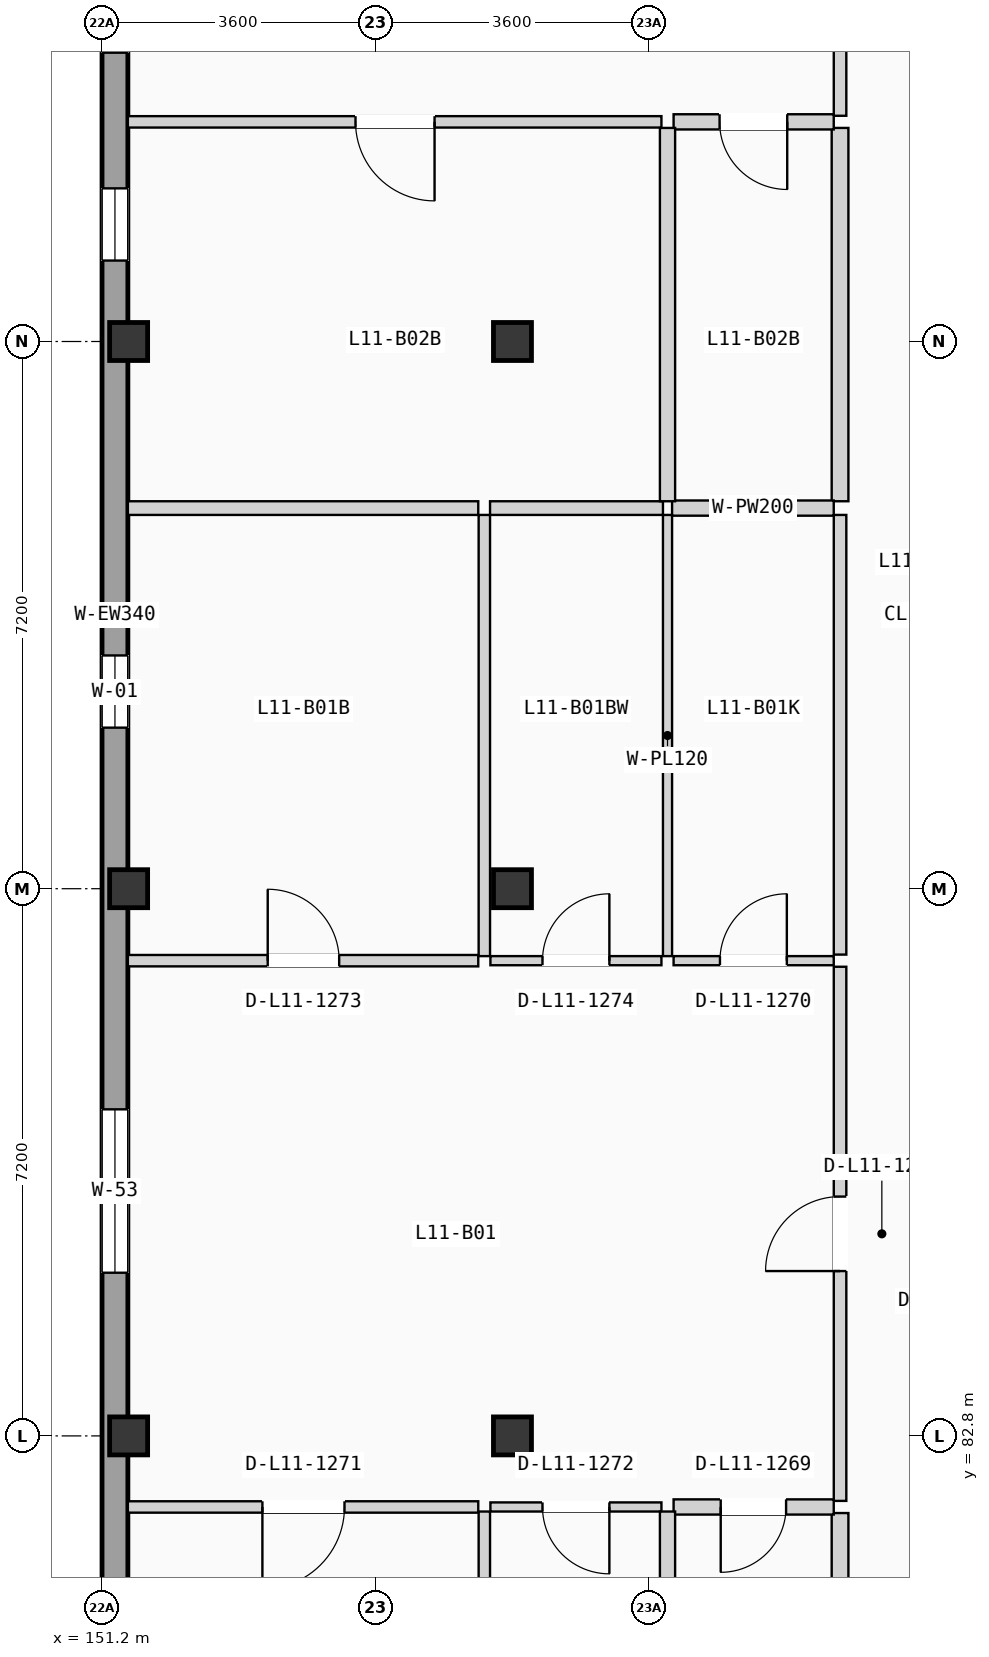
"""IFC4 building model, lengths in metres.
Left out: names, types, materials, properties, quantities, classifications, styles, units other than length and angle.
Written with IfcOpenShell. Run it as: python <this file> out.ifc"""

import sys

from ifc_helpers import new_model, si_unit, direction, frame, frame_2d, origin, origin_2d, place, context, subcontext, project, spatial, rectangle, extrude, element, fill, save


model = new_model("IFC4")
c1 = context("Model", 3, precision=1e-05, world=origin(), true_north=direction((0.0, 1.0)))
c2 = subcontext(c1, "Body", "Model", "MODEL_VIEW")
j1 = project(units=[si_unit("LENGTHUNIT", "METRE"), si_unit("PLANEANGLEUNIT", "RADIAN")], contexts=[c1])
p1 = place(None, origin())
s1 = spatial("IfcSite", under=j1, at=p1, CompositionType="ELEMENT")
p2 = place(p1, origin())
s2 = spatial("IfcBuilding", under=s1, at=p2, CompositionType="ELEMENT")
p3 = place(p2, frame((0.0, 0.0, 37.275)))
s3 = spatial("IfcBuildingStorey", under=s2, at=p3, CompositionType="ELEMENT", Elevation=37.275)
for number, where, z_axis, x_axis in (
    (1, (151.55, 82.8, 0.0), (0.0, 0.0, 1.0), (1.0, 0.0, 0.0)),
    (2, (151.55, 90.0, 0.0), (0.0, 0.0, 1.0), (1.0, 0.0, 0.0)),
    (3, (151.55, 97.2, 0.0), (0.0, 0.0, 1.0), (1.0, 0.0, 0.0)),
    (4, (156.6, 82.8, 0.0), (0.0, 0.0, 1.0), (1.0, 0.0, 0.0)),
    (5, (156.6, 90.0, 0.0), (0.0, 0.0, 1.0), (1.0, 0.0, 0.0)),
    (6, (156.6, 97.2, 0.0), (0.0, 0.0, 1.0), (1.0, 0.0, 0.0)),
):
    element("IfcColumn", number, at=place(p3, frame(where, z_axis=z_axis, x_axis=x_axis)), inside=s3, PredefinedType="COLUMN", context=c2, shape_type="SweptSolid", body=[
        extrude(rectangle(XDim=0.5, YDim=0.5, at=origin_2d()), origin(), (0.0, 0.0, 1.0), 3.15),
    ])
p4 = place(p3, frame((151.37, 68.74, 0.0), z_axis=(0.0, 0.0, 1.0), x_axis=(0.0, 1.0, 0.0)))
e7 = element("IfcWall", 7, at=p4, inside=s3, PredefinedType="SOLIDWALL", context=c2, shape_type="SweptSolid", body=[
    extrude(rectangle(XDim=49.72, YDim=0.34, at=frame_2d((24.86, 0.0))), origin(), (0.0, 0.0, 1.0), 2.6),
])
p5 = place(p4, frame((16.207, 0.0, 0.665)))
e8 = element("IfcOpeningElement", 8, at=p5, cuts=e7, PredefinedType="OPENING", context=c2, shape_type="SweptSolid", body=[
    extrude(rectangle(XDim=2.15, YDim=1.5, at=frame_2d((1.075, 0.75))), frame((0.0, 0.18, 0.0), z_axis=(0.0, -1.0, 0.0), x_axis=(1.0, 0.0, 0.0)), (0.0, 0.0, 1.0), 0.36),
])
p6 = place(p4, frame((9.078, 0.0, 0.515)))
e9 = element("IfcOpeningElement", 9, at=p6, cuts=e7, PredefinedType="OPENING", context=c2, shape_type="SweptSolid", body=[
    extrude(rectangle(XDim=2.15, YDim=1.65, at=frame_2d((1.075, 0.825))), frame((0.0, 0.18, 0.0), z_axis=(0.0, -1.0, 0.0), x_axis=(1.0, 0.0, 0.0)), (0.0, 0.0, 1.0), 0.36),
])
p7 = place(p4, frame((23.379, 0.0, 0.85)))
e10 = element("IfcOpeningElement", 10, at=p7, cuts=e7, PredefinedType="OPENING", context=c2, shape_type="SweptSolid", body=[
    extrude(rectangle(XDim=0.95, YDim=1.2, at=frame_2d((0.475, 0.6))), frame((0.0, 0.18, 0.0), z_axis=(0.0, -1.0, 0.0), x_axis=(1.0, 0.0, 0.0)), (0.0, 0.0, 1.0), 0.36),
])
p8 = place(p4, frame((32.26, 0.0, 0.9)))
e11 = element("IfcOpeningElement", 11, at=p8, cuts=e7, PredefinedType="OPENING", context=c2, shape_type="SweptSolid", body=[
    extrude(rectangle(XDim=2.3, YDim=1.2, at=frame_2d((1.15, 0.6))), frame((0.0, 0.18, 0.0), z_axis=(0.0, -1.0, 0.0), x_axis=(1.0, 0.0, 0.0)), (0.0, 0.0, 1.0), 0.36),
])
p9 = place(p4, frame((29.525, 0.0, 0.85)))
e12 = element("IfcOpeningElement", 12, at=p9, cuts=e7, PredefinedType="OPENING", context=c2, shape_type="SweptSolid", body=[
    extrude(rectangle(XDim=0.95, YDim=1.2, at=frame_2d((0.475, 0.6))), frame((0.0, 0.18, 0.0), z_axis=(0.0, -1.0, 0.0), x_axis=(1.0, 0.0, 0.0)), (0.0, 0.0, 1.0), 0.36),
])
p10 = place(p4, frame((38.854, 0.0, 0.665)))
e13 = element("IfcOpeningElement", 13, at=p10, cuts=e7, PredefinedType="OPENING", context=c2, shape_type="SweptSolid", body=[
    extrude(rectangle(XDim=2.3, YDim=1.5, at=frame_2d((1.15, 0.75))), frame((0.0, 0.18, 0.0), z_axis=(0.0, -1.0, 0.0), x_axis=(1.0, 0.0, 0.0)), (0.0, 0.0, 1.0), 0.36),
])
p11 = place(p3, frame((160.91, 81.945, 0.0), z_axis=(0.0, 0.0, 1.0), x_axis=(0.0, 1.0, 0.0)))
e14 = element("IfcWall", 14, at=p11, inside=s3, PredefinedType="PARTITIONING", context=c2, shape_type="SweptSolid", body=[
    extrude(rectangle(XDim=7.028, YDim=0.165, at=frame_2d((3.514, 0.0))), origin(), (0.0, 0.0, 1.0), 2.87),
])
p12 = place(p11, frame((3.024, 0.0, 0.0)))
e15 = element("IfcOpeningElement", 15, at=p12, cuts=e14, PredefinedType="OPENING", context=c2, shape_type="SweptSolid", body=[
    extrude(rectangle(XDim=0.98, YDim=2.08, at=frame_2d((0.49, 1.04))), frame((0.0, 0.093, 0.0), z_axis=(0.0, -1.0, 0.0), x_axis=(1.0, 0.0, 0.0)), (0.0, 0.0, 1.0), 0.185),
])
p13 = place(p3, frame((160.91, 76.0, 0.0), z_axis=(0.0, 0.0, 1.0), x_axis=(0.0, 1.0, 0.0)))
e16 = element("IfcWall", 16, at=p13, inside=s3, PredefinedType="PLUMBINGWALL", context=c2, shape_type="SweptSolid", body=[
    extrude(rectangle(XDim=5.785, YDim=0.22, at=frame_2d((2.893, 0.0))), origin(), (0.0, 0.0, 1.0), 2.87),
])
p14 = place(p3, frame((160.91, 89.133, 0.0), z_axis=(0.0, 0.0, 1.0), x_axis=(0.0, 1.0, 0.0)))
e17 = element("IfcWall", 17, at=p14, inside=s3, PredefinedType="PARTITIONING", context=c2, shape_type="SweptSolid", body=[
    extrude(rectangle(XDim=5.785, YDim=0.165, at=frame_2d((2.893, 0.0))), origin(), (0.0, 0.0, 1.0), 2.87),
])
p15 = place(p3, frame((160.91, 100.17, 0.0), z_axis=(0.0, 0.0, 1.0), x_axis=(0.0, 1.0, 0.0)))
e18 = element("IfcWall", 18, at=p15, inside=s3, PredefinedType="PARTITIONING", context=c2, shape_type="SweptSolid", body=[
    extrude(rectangle(XDim=5.958, YDim=0.165, at=frame_2d((2.979, 0.0))), origin(), (0.0, 0.0, 1.0), 2.87),
])
p16 = place(p15, frame((2.489, 0.0, 0.0)))
e19 = element("IfcOpeningElement", 19, at=p16, cuts=e18, PredefinedType="OPENING", context=c2, shape_type="SweptSolid", body=[
    extrude(rectangle(XDim=0.98, YDim=2.08, at=frame_2d((0.49, 1.04))), frame((0.0, 0.093, 0.0), z_axis=(0.0, -1.0, 0.0), x_axis=(1.0, 0.0, 0.0)), (0.0, 0.0, 1.0), 0.185),
])
p17 = place(p3, frame((160.91, 95.098, 0.0), z_axis=(0.0, 0.0, 1.0), x_axis=(0.0, 1.0, 0.0)))
e20 = element("IfcWall", 20, at=p17, inside=s3, PredefinedType="PLUMBINGWALL", context=c2, shape_type="SweptSolid", body=[
    extrude(rectangle(XDim=4.912, YDim=0.22, at=frame_2d((2.456, 0.0))), origin(), (0.0, 0.0, 1.0), 2.87),
])
p18 = place(p3, frame((158.72, 81.865, 0.0), z_axis=(0.0, 0.0, 1.0), x_axis=(1.0, 0.0, 0.0)))
e21 = element("IfcWall", 21, at=p18, inside=s3, PredefinedType="PLUMBINGWALL", context=c2, shape_type="SweptSolid", body=[
    extrude(rectangle(XDim=2.107, YDim=0.2, at=frame_2d((1.053, 0.0))), origin(), (0.0, 0.0, 1.0), 2.87),
])
p19 = place(p18, frame((0.62, 0.0, 0.0)))
e22 = element("IfcOpeningElement", 22, at=p19, cuts=e21, PredefinedType="OPENING", context=c2, shape_type="SweptSolid", body=[
    extrude(rectangle(XDim=0.86, YDim=2.0, at=frame_2d((0.43, 1.0))), frame((0.0, 0.11, 0.0), z_axis=(0.0, -1.0, 0.0), x_axis=(1.0, 0.0, 0.0)), (0.0, 0.0, 1.0), 0.22),
])
p20 = place(p3, frame((158.72, 89.053, 0.0), z_axis=(0.0, 0.0, 1.0), x_axis=(1.0, 0.0, 0.0)))
e23 = element("IfcWall", 23, at=p20, inside=s3, PredefinedType="PARTITIONING", context=c2, shape_type="SweptSolid", body=[
    extrude(rectangle(XDim=2.107, YDim=0.12, at=frame_2d((1.053, 0.0))), origin(), (0.0, 0.0, 1.0), 2.87),
])
p21 = place(p20, frame((0.61, 0.0, 0.0)))
e24 = element("IfcOpeningElement", 24, at=p21, cuts=e23, PredefinedType="OPENING", context=c2, shape_type="SweptSolid", body=[
    extrude(rectangle(XDim=0.88, YDim=2.02, at=frame_2d((0.44, 1.01))), frame((0.0, 0.07, 0.0), z_axis=(0.0, -1.0, 0.0), x_axis=(1.0, 0.0, 0.0)), (0.0, 0.0, 1.0), 0.14),
])
p22 = place(p3, frame((151.54, 81.865, 0.0), z_axis=(0.0, 0.0, 1.0), x_axis=(1.0, 0.0, 0.0)))
e25 = element("IfcWall", 25, at=p22, inside=s3, PredefinedType="PARTITIONING", context=c2, shape_type="SweptSolid", body=[
    extrude(rectangle(XDim=4.61, YDim=0.15, at=frame_2d((2.305, 0.0))), origin(), (0.0, 0.0, 1.0), 2.87),
])
p23 = place(p22, frame((1.77, 0.0, 0.0)))
e26 = element("IfcOpeningElement", 26, at=p23, cuts=e25, PredefinedType="OPENING", context=c2, shape_type="SweptSolid", body=[
    extrude(rectangle(XDim=1.08, YDim=2.1, at=frame_2d((0.54, 1.05))), frame((0.0, 0.085, 0.0), z_axis=(0.0, -1.0, 0.0), x_axis=(1.0, 0.0, 0.0)), (0.0, 0.0, 1.0), 0.17),
])
p24 = place(p3, frame((156.31, 81.865, 0.0), z_axis=(0.0, 0.0, 1.0), x_axis=(1.0, 0.0, 0.0)))
e27 = element("IfcWall", 27, at=p24, inside=s3, PredefinedType="PARTITIONING", context=c2, shape_type="SweptSolid", body=[
    extrude(rectangle(XDim=2.25, YDim=0.12, at=frame_2d((1.125, 0.0))), origin(), (0.0, 0.0, 1.0), 2.87),
])
p25 = place(p24, frame((0.685, 0.0, 0.0)))
e28 = element("IfcOpeningElement", 28, at=p25, cuts=e27, PredefinedType="OPENING", context=c2, shape_type="SweptSolid", body=[
    extrude(rectangle(XDim=0.88, YDim=2.02, at=frame_2d((0.44, 1.01))), frame((0.0, 0.07, 0.0), z_axis=(0.0, -1.0, 0.0), x_axis=(1.0, 0.0, 0.0)), (0.0, 0.0, 1.0), 0.14),
])
p26 = place(p3, frame((151.54, 89.053, 0.0), z_axis=(0.0, 0.0, 1.0), x_axis=(1.0, 0.0, 0.0)))
e29 = element("IfcWall", 29, at=p26, inside=s3, PredefinedType="PARTITIONING", context=c2, shape_type="SweptSolid", body=[
    extrude(rectangle(XDim=4.61, YDim=0.15, at=frame_2d((2.305, 0.0))), origin(), (0.0, 0.0, 1.0), 2.87),
])
p27 = place(p26, frame((1.84, 0.0, 0.0)))
e30 = element("IfcOpeningElement", 30, at=p27, cuts=e29, PredefinedType="OPENING", context=c2, shape_type="SweptSolid", body=[
    extrude(rectangle(XDim=0.94, YDim=2.06, at=frame_2d((0.47, 1.03))), frame((0.0, 0.085, 0.0), z_axis=(0.0, -1.0, 0.0), x_axis=(1.0, 0.0, 0.0)), (0.0, 0.0, 1.0), 0.17),
])
p28 = place(p3, frame((156.31, 89.053, 0.0), z_axis=(0.0, 0.0, 1.0), x_axis=(1.0, 0.0, 0.0)))
e31 = element("IfcWall", 31, at=p28, inside=s3, PredefinedType="PARTITIONING", context=c2, shape_type="SweptSolid", body=[
    extrude(rectangle(XDim=2.25, YDim=0.12, at=frame_2d((1.125, 0.0))), origin(), (0.0, 0.0, 1.0), 2.87),
])
p29 = place(p28, frame((0.685, 0.0, 0.0)))
e32 = element("IfcOpeningElement", 32, at=p29, cuts=e31, PredefinedType="OPENING", context=c2, shape_type="SweptSolid", body=[
    extrude(rectangle(XDim=0.88, YDim=2.02, at=frame_2d((0.44, 1.01))), frame((0.0, 0.07, 0.0), z_axis=(0.0, -1.0, 0.0), x_axis=(1.0, 0.0, 0.0)), (0.0, 0.0, 1.0), 0.14),
])
p30 = place(p3, frame((158.64, 76.0, 0.0), z_axis=(0.0, 0.0, 1.0), x_axis=(0.0, 1.0, 0.0)))
e33 = element("IfcWall", 33, at=p30, inside=s3, PredefinedType="PLUMBINGWALL", context=c2, shape_type="SweptSolid", body=[
    extrude(rectangle(XDim=5.805, YDim=0.2, at=frame_2d((2.902, 0.0))), origin(), (0.0, 0.0, 1.0), 2.87),
])
p31 = place(p30, frame((2.467, 0.0, 0.0)))
e34 = element("IfcOpeningElement", 34, at=p31, cuts=e33, PredefinedType="OPENING", context=c2, shape_type="SweptSolid", body=[
    extrude(rectangle(XDim=0.85, YDim=2.01, at=frame_2d((0.425, 1.005))), frame((0.0, 0.11, 0.0), z_axis=(0.0, -1.0, 0.0), x_axis=(1.0, 0.0, 0.0)), (0.0, 0.0, 1.0), 0.22),
])
p32 = place(p3, frame((158.64, 89.113, 0.0), z_axis=(0.0, 0.0, 1.0), x_axis=(0.0, 1.0, 0.0)))
e35 = element("IfcWall", 35, at=p32, inside=s3, PredefinedType="PARTITIONING", context=c2, shape_type="SweptSolid", body=[
    extrude(rectangle(XDim=5.805, YDim=0.12, at=frame_2d((2.902, 0.0))), origin(), (0.0, 0.0, 1.0), 2.87),
])
p33 = place(p3, frame((158.7, 95.008, 0.0), z_axis=(0.0, 0.0, 1.0), x_axis=(1.0, 0.0, 0.0)))
e36 = element("IfcWall", 36, at=p33, inside=s3, PredefinedType="PLUMBINGWALL", context=c2, shape_type="SweptSolid", body=[
    extrude(rectangle(XDim=2.127, YDim=0.2, at=frame_2d((1.063, 0.0))), origin(), (0.0, 0.0, 1.0), 2.87),
])
for number, where, z_axis, x_axis in (
    (37, (156.23, 76.0, 0.0), (0.0, 0.0, 1.0), (0.0, 1.0, 0.0)),
    (38, (156.23, 89.113, 0.0), (0.0, 0.0, 1.0), (0.0, 1.0, 0.0)),
):
    element("IfcWall", number, at=place(p3, frame(where, z_axis=z_axis, x_axis=x_axis)), inside=s3, PredefinedType="PARTITIONING", context=c2, shape_type="SweptSolid", body=[
        extrude(rectangle(XDim=5.805, YDim=0.15, at=frame_2d((2.902, 0.0))), origin(), (0.0, 0.0, 1.0), 2.87),
    ])
p34 = place(p3, frame((151.54, 95.008, 0.0), z_axis=(0.0, 0.0, 1.0), x_axis=(1.0, 0.0, 0.0)))
e39 = element("IfcWall", 39, at=p34, inside=s3, PredefinedType="PARTITIONING", context=c2, shape_type="SweptSolid", body=[
    extrude(rectangle(XDim=4.61, YDim=0.18, at=frame_2d((2.305, 0.0))), origin(), (0.0, 0.0, 1.0), 2.87),
])
p35 = place(p3, frame((156.305, 95.008, 0.0), z_axis=(0.0, 0.0, 1.0), x_axis=(1.0, 0.0, 0.0)))
e40 = element("IfcWall", 40, at=p35, inside=s3, PredefinedType="PARTITIONING", context=c2, shape_type="SweptSolid", body=[
    extrude(rectangle(XDim=2.275, YDim=0.18, at=frame_2d((1.138, 0.0))), origin(), (0.0, 0.0, 1.0), 2.87),
])
p36 = place(p3, frame((158.72, 100.09, 0.0), z_axis=(0.0, 0.0, 1.0), x_axis=(1.0, 0.0, 0.0)))
e41 = element("IfcWall", 41, at=p36, inside=s3, PredefinedType="PLUMBINGWALL", context=c2, shape_type="SweptSolid", body=[
    extrude(rectangle(XDim=2.107, YDim=0.2, at=frame_2d((1.053, 0.0))), origin(), (0.0, 0.0, 1.0), 2.87),
])
p37 = place(p36, frame((0.605, 0.0, 0.0)))
e42 = element("IfcOpeningElement", 42, at=p37, cuts=e41, PredefinedType="OPENING", context=c2, shape_type="SweptSolid", body=[
    extrude(rectangle(XDim=0.89, YDim=2.03, at=frame_2d((0.445, 1.015))), frame((0.0, 0.11, 0.0), z_axis=(0.0, -1.0, 0.0), x_axis=(1.0, 0.0, 0.0)), (0.0, 0.0, 1.0), 0.22),
])
p38 = place(p3, frame((151.54, 100.09, 0.0), z_axis=(0.0, 0.0, 1.0), x_axis=(1.0, 0.0, 0.0)))
e43 = element("IfcWall", 43, at=p38, inside=s3, PredefinedType="PARTITIONING", context=c2, shape_type="SweptSolid", body=[
    extrude(rectangle(XDim=7.02, YDim=0.15, at=frame_2d((3.51, 0.0))), origin(), (0.0, 0.0, 1.0), 2.87),
])
p39 = place(p38, frame((2.995, 0.0, 0.0)))
e44 = element("IfcOpeningElement", 44, at=p39, cuts=e43, PredefinedType="OPENING", context=c2, shape_type="SweptSolid", body=[
    extrude(rectangle(XDim=1.04, YDim=2.08, at=frame_2d((0.52, 1.04))), frame((0.0, 0.085, 0.0), z_axis=(0.0, -1.0, 0.0), x_axis=(1.0, 0.0, 0.0)), (0.0, 0.0, 1.0), 0.17),
])
p40 = place(p3, frame((158.64, 95.098, 0.0), z_axis=(0.0, 0.0, 1.0), x_axis=(0.0, 1.0, 0.0)))
e45 = element("IfcWall", 45, at=p40, inside=s3, PredefinedType="PLUMBINGWALL", context=c2, shape_type="SweptSolid", body=[
    extrude(rectangle(XDim=4.912, YDim=0.2, at=frame_2d((2.456, 0.0))), origin(), (0.0, 0.0, 1.0), 2.87),
])
p41 = place(p5, origin())
e46 = element("IfcWindow", 46, at=p41, inside=s3, PartitioningType="DOUBLE_PANEL_VERTICAL", PredefinedType="WINDOW", context=c2, shape_type="SweptSolid", body=[
    extrude(rectangle(XDim=2.15, YDim=1.5, at=frame_2d((1.075, 0.75))), frame((0.0, 0.03, 0.0), z_axis=(0.0, -1.0, 0.0), x_axis=(1.0, 0.0, 0.0)), (0.0, 0.0, 1.0), 0.06),
])
fill(e8, e46)
p42 = place(p7, origin())
e47 = element("IfcWindow", 47, at=p42, inside=s3, PartitioningType="SINGLE_PANEL", PredefinedType="WINDOW", context=c2, shape_type="SweptSolid", body=[
    extrude(rectangle(XDim=0.95, YDim=1.2, at=frame_2d((0.475, 0.6))), frame((0.0, 0.03, 0.0), z_axis=(0.0, -1.0, 0.0), x_axis=(1.0, 0.0, 0.0)), (0.0, 0.0, 1.0), 0.06),
])
fill(e10, e47)
p43 = place(p8, origin())
e48 = element("IfcWindow", 48, at=p43, inside=s3, PartitioningType="DOUBLE_PANEL_VERTICAL", PredefinedType="WINDOW", context=c2, shape_type="SweptSolid", body=[
    extrude(rectangle(XDim=2.3, YDim=1.2, at=frame_2d((1.15, 0.6))), frame((0.0, 0.03, 0.0), z_axis=(0.0, -1.0, 0.0), x_axis=(1.0, 0.0, 0.0)), (0.0, 0.0, 1.0), 0.06),
])
fill(e11, e48)
p44 = place(p9, origin())
e49 = element("IfcWindow", 49, at=p44, inside=s3, PartitioningType="SINGLE_PANEL", PredefinedType="WINDOW", context=c2, shape_type="SweptSolid", body=[
    extrude(rectangle(XDim=0.95, YDim=1.2, at=frame_2d((0.475, 0.6))), frame((0.0, 0.03, 0.0), z_axis=(0.0, -1.0, 0.0), x_axis=(1.0, 0.0, 0.0)), (0.0, 0.0, 1.0), 0.06),
])
fill(e12, e49)
p45 = place(p12, origin())
e50 = element("IfcDoor", 50, at=p45, inside=s3, OperationType="SINGLE_SWING_LEFT", PredefinedType="DOOR", context=c2, shape_type="SweptSolid", body=[
    extrude(rectangle(XDim=0.98, YDim=2.08, at=frame_2d((0.49, 1.04))), frame((0.0, 0.025, 0.0), z_axis=(0.0, -1.0, 0.0), x_axis=(1.0, 0.0, 0.0)), (0.0, 0.0, 1.0), 0.05),
])
fill(e15, e50)
p46 = place(p19, frame((0.86, 0.0, 0.0), z_axis=(0.0, 0.0, 1.0), x_axis=(-1.0, 0.0, 0.0)))
e51 = element("IfcDoor", 51, at=p46, inside=s3, OperationType="SINGLE_SWING_LEFT", PredefinedType="DOOR", context=c2, shape_type="SweptSolid", body=[
    extrude(rectangle(XDim=0.86, YDim=2.0, at=frame_2d((0.43, 1.0))), frame((0.0, 0.025, 0.0), z_axis=(0.0, -1.0, 0.0), x_axis=(1.0, 0.0, 0.0)), (0.0, 0.0, 1.0), 0.05),
])
fill(e22, e51)
p47 = place(p21, origin())
e52 = element("IfcDoor", 52, at=p47, inside=s3, OperationType="SINGLE_SWING_RIGHT", PredefinedType="DOOR", context=c2, shape_type="SweptSolid", body=[
    extrude(rectangle(XDim=0.88, YDim=2.02, at=frame_2d((0.44, 1.01))), frame((0.0, 0.025, 0.0), z_axis=(0.0, -1.0, 0.0), x_axis=(1.0, 0.0, 0.0)), (0.0, 0.0, 1.0), 0.05),
])
fill(e24, e52)
p48 = place(p23, frame((1.08, 0.0, 0.0), z_axis=(0.0, 0.0, 1.0), x_axis=(-1.0, 0.0, 0.0)))
e53 = element("IfcDoor", 53, at=p48, inside=s3, OperationType="SINGLE_SWING_LEFT", PredefinedType="DOOR", context=c2, shape_type="SweptSolid", body=[
    extrude(rectangle(XDim=1.08, YDim=2.1, at=frame_2d((0.54, 1.05))), frame((0.0, 0.025, 0.0), z_axis=(0.0, -1.0, 0.0), x_axis=(1.0, 0.0, 0.0)), (0.0, 0.0, 1.0), 0.05),
])
fill(e26, e53)
p49 = place(p25, frame((0.88, 0.0, 0.0), z_axis=(0.0, 0.0, 1.0), x_axis=(-1.0, 0.0, 0.0)))
e54 = element("IfcDoor", 54, at=p49, inside=s3, OperationType="SINGLE_SWING_RIGHT", PredefinedType="DOOR", context=c2, shape_type="SweptSolid", body=[
    extrude(rectangle(XDim=0.88, YDim=2.02, at=frame_2d((0.44, 1.01))), frame((0.0, 0.025, 0.0), z_axis=(0.0, -1.0, 0.0), x_axis=(1.0, 0.0, 0.0)), (0.0, 0.0, 1.0), 0.05),
])
fill(e28, e54)
p50 = place(p27, origin())
e55 = element("IfcDoor", 55, at=p50, inside=s3, OperationType="SINGLE_SWING_LEFT", PredefinedType="DOOR", context=c2, shape_type="SweptSolid", body=[
    extrude(rectangle(XDim=0.94, YDim=2.06, at=frame_2d((0.47, 1.03))), frame((0.0, 0.025, 0.0), z_axis=(0.0, -1.0, 0.0), x_axis=(1.0, 0.0, 0.0)), (0.0, 0.0, 1.0), 0.05),
])
fill(e30, e55)
p51 = place(p29, origin())
e56 = element("IfcDoor", 56, at=p51, inside=s3, OperationType="SINGLE_SWING_RIGHT", PredefinedType="DOOR", context=c2, shape_type="SweptSolid", body=[
    extrude(rectangle(XDim=0.88, YDim=2.02, at=frame_2d((0.44, 1.01))), frame((0.0, 0.025, 0.0), z_axis=(0.0, -1.0, 0.0), x_axis=(1.0, 0.0, 0.0)), (0.0, 0.0, 1.0), 0.05),
])
fill(e32, e56)
p52 = place(p37, frame((0.89, 0.0, 0.0), z_axis=(0.0, 0.0, 1.0), x_axis=(-1.0, 0.0, 0.0)))
e57 = element("IfcDoor", 57, at=p52, inside=s3, OperationType="SINGLE_SWING_RIGHT", PredefinedType="DOOR", context=c2, shape_type="SweptSolid", body=[
    extrude(rectangle(XDim=0.89, YDim=2.03, at=frame_2d((0.445, 1.015))), frame((0.0, 0.025, 0.0), z_axis=(0.0, -1.0, 0.0), x_axis=(1.0, 0.0, 0.0)), (0.0, 0.0, 1.0), 0.05),
])
fill(e42, e57)
p53 = place(p39, frame((1.04, 0.0, 0.0), z_axis=(0.0, 0.0, 1.0), x_axis=(-1.0, 0.0, 0.0)))
e58 = element("IfcDoor", 58, at=p53, inside=s3, OperationType="SINGLE_SWING_RIGHT", PredefinedType="DOOR", context=c2, shape_type="SweptSolid", body=[
    extrude(rectangle(XDim=1.04, YDim=2.08, at=frame_2d((0.52, 1.04))), frame((0.0, 0.025, 0.0), z_axis=(0.0, -1.0, 0.0), x_axis=(1.0, 0.0, 0.0)), (0.0, 0.0, 1.0), 0.05),
])
fill(e44, e58)
save(model, sys.argv[1])
